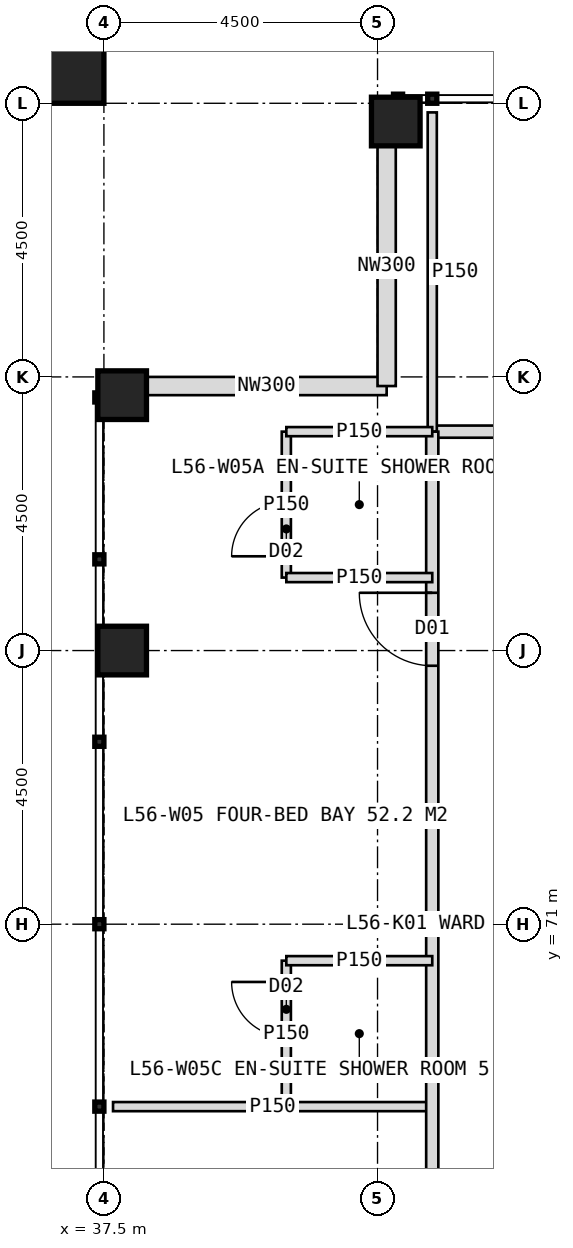
"""IFC4 building model, lengths in metres.
Left out: names, types, materials, properties, quantities, classifications, styles, units other than length and angle.
Written with IfcOpenShell. Run it as: python <this file> out.ifc"""

import sys

from ifc_helpers import new_model, si_unit, direction, frame, frame_2d, origin, origin_2d, place, context, subcontext, project, spatial, rectangle, hollow_rectangle, extrude, element, fill, save


model = new_model("IFC4")
c1 = context("Model", 3, precision=1e-05, world=origin(), true_north=direction((0.0, 1.0)))
c2 = subcontext(c1, "Body", "Model", "MODEL_VIEW")
j1 = project(units=[si_unit("LENGTHUNIT", "METRE"), si_unit("PLANEANGLEUNIT", "RADIAN")], contexts=[c1])
p1 = place(None, origin())
s1 = spatial("IfcSite", under=j1, at=p1, CompositionType="ELEMENT")
p2 = place(p1, origin())
s2 = spatial("IfcBuilding", under=s1, at=p2, CompositionType="ELEMENT")
p3 = place(p2, frame((0.0, 0.0, 233.0)))
s3 = spatial("IfcBuildingStorey", under=s2, at=p3, CompositionType="ELEMENT", Elevation=233.0)
for number, where, z_axis, x_axis in (
    (1, (42.3, 84.2, 0.0), (0.0, 0.0, 1.0), (1.0, 0.0, 0.0)),
    (2, (37.8, 75.5, 0.0), (0.0, 0.0, 1.0), (1.0, 0.0, 0.0)),
    (3, (37.8, 79.7, 0.0), (0.0, 0.0, 1.0), (1.0, 0.0, 0.0)),
):
    element("IfcColumn", number, at=place(p3, frame(where, z_axis=z_axis, x_axis=x_axis)), inside=s3, PredefinedType="COLUMN", context=c2, shape_type="SweptSolid", body=[
        extrude(hollow_rectangle(XDim=0.8, YDim=0.8, WallThickness=0.08, at=origin_2d()), origin(), (0.0, 0.0, 1.0), 4.0),
    ])
p4 = place(p3, frame((36.9, 85.1, 0.0), z_axis=(0.0, 0.0, 1.0), x_axis=(1.0, 0.0, 0.0)))
e4 = element("IfcColumn", 4, at=p4, inside=s3, PredefinedType="COLUMN", context=c2, shape_type="SweptSolid", body=[
    extrude(hollow_rectangle(XDim=1.2, YDim=1.2, WallThickness=0.07, at=origin_2d()), origin(), (0.0, 0.0, 1.0), 4.0),
])
for number, where, z_axis, x_axis in (
    (5, (38.2, 79.85, 0.0), (0.0, 0.0, 1.0), (1.0, 0.0, 0.0)),
    (6, (42.15, 79.85, 0.0), (0.0, 0.0, 1.0), (0.0, 1.0, 0.0)),
):
    element("IfcWall", number, at=place(p3, frame(where, z_axis=z_axis, x_axis=x_axis)), inside=s3, PredefinedType="ELEMENTEDWALL", context=c2, shape_type="SweptSolid", body=[
        extrude(rectangle(XDim=3.95, YDim=0.3, at=frame_2d((1.975, 0.0))), origin(), (0.0, 0.0, 1.0), 2.85),
    ])
p5 = place(p3, frame((42.9, 79.1, 0.0), z_axis=(0.0, 0.0, 1.0), x_axis=(1.0, 0.0, 0.0)))
e7 = element("IfcWall", 7, at=p5, inside=s3, PredefinedType="PARTITIONING", context=c2, shape_type="SweptSolid", body=[
    extrude(rectangle(XDim=34.2, YDim=0.2, at=frame_2d((17.1, 0.0))), origin(), (0.0, 0.0, 1.0), 3.75),
])
p6 = place(p5, frame((3.55, 0.0, 0.0)))
e8 = element("IfcOpeningElement", 8, at=p6, cuts=e7, PredefinedType="OPENING", context=c2, shape_type="SweptSolid", body=[
    extrude(rectangle(XDim=1.0, YDim=2.1, at=frame_2d((0.5, 1.05))), frame((0.0, 0.11, 0.0), z_axis=(0.0, -1.0, 0.0), x_axis=(1.0, 0.0, 0.0)), (0.0, 0.0, 1.0), 0.22),
])
p7 = place(p5, frame((10.75, 0.0, 0.0)))
e9 = element("IfcOpeningElement", 9, at=p7, cuts=e7, PredefinedType="OPENING", context=c2, shape_type="SweptSolid", body=[
    extrude(rectangle(XDim=1.2, YDim=2.2, at=frame_2d((0.6, 1.1))), frame((0.0, 0.11, 0.0), z_axis=(0.0, -1.0, 0.0), x_axis=(1.0, 0.0, 0.0)), (0.0, 0.0, 1.0), 0.22),
])
p8 = place(p5, frame((16.25, 0.0, 0.0)))
e10 = element("IfcOpeningElement", 10, at=p8, cuts=e7, PredefinedType="OPENING", context=c2, shape_type="SweptSolid", body=[
    extrude(rectangle(XDim=1.2, YDim=2.2, at=frame_2d((0.6, 1.1))), frame((0.0, 0.11, 0.0), z_axis=(0.0, -1.0, 0.0), x_axis=(1.0, 0.0, 0.0)), (0.0, 0.0, 1.0), 0.22),
])
p9 = place(p5, frame((22.75, 0.0, 0.0)))
e11 = element("IfcOpeningElement", 11, at=p9, cuts=e7, PredefinedType="OPENING", context=c2, shape_type="SweptSolid", body=[
    extrude(rectangle(XDim=1.2, YDim=2.2, at=frame_2d((0.6, 1.1))), frame((0.0, 0.11, 0.0), z_axis=(0.0, -1.0, 0.0), x_axis=(1.0, 0.0, 0.0)), (0.0, 0.0, 1.0), 0.22),
])
p10 = place(p5, frame((29.75, 0.0, 0.0)))
e12 = element("IfcOpeningElement", 12, at=p10, cuts=e7, PredefinedType="OPENING", context=c2, shape_type="SweptSolid", body=[
    extrude(rectangle(XDim=1.2, YDim=2.2, at=frame_2d((0.6, 1.1))), frame((0.0, 0.11, 0.0), z_axis=(0.0, -1.0, 0.0), x_axis=(1.0, 0.0, 0.0)), (0.0, 0.0, 1.0), 0.22),
])
for number, where, z_axis, x_axis in (
    (13, (42.9, 79.1, 0.0), (0.0, 0.0, 1.0), (0.0, 1.0, 0.0)),
    (14, (42.9, 68.0, 0.0), (0.0, 0.0, 1.0), (-1.0, 0.0, 0.0)),
):
    element("IfcWall", number, at=place(p3, frame(where, z_axis=z_axis, x_axis=x_axis)), inside=s3, PredefinedType="PARTITIONING", context=c2, shape_type="SweptSolid", body=[
        extrude(rectangle(XDim=5.25, YDim=0.15, at=frame_2d((2.625, 0.0))), origin(), (0.0, 0.0, 1.0), 3.75),
    ])
p11 = place(p3, frame((42.9, 44.9, 0.0), z_axis=(0.0, 0.0, 1.0), x_axis=(0.0, 1.0, 0.0)))
e15 = element("IfcWall", 15, at=p11, inside=s3, PredefinedType="PARTITIONING", context=c2, shape_type="SweptSolid", body=[
    extrude(rectangle(XDim=34.2, YDim=0.2, at=frame_2d((17.1, 0.0))), origin(), (0.0, 0.0, 1.0), 3.75),
])
p12 = place(p11, frame((1.25, 0.0, 0.0)))
e16 = element("IfcOpeningElement", 16, at=p12, cuts=e15, PredefinedType="OPENING", context=c2, shape_type="SweptSolid", body=[
    extrude(rectangle(XDim=1.2, YDim=2.2, at=frame_2d((0.6, 1.1))), frame((0.0, 0.11, 0.0), z_axis=(0.0, -1.0, 0.0), x_axis=(1.0, 0.0, 0.0)), (0.0, 0.0, 1.0), 0.22),
])
p13 = place(p11, frame((7.75, 0.0, 0.0)))
e17 = element("IfcOpeningElement", 17, at=p13, cuts=e15, PredefinedType="OPENING", context=c2, shape_type="SweptSolid", body=[
    extrude(rectangle(XDim=1.2, YDim=2.2, at=frame_2d((0.6, 1.1))), frame((0.0, 0.11, 0.0), z_axis=(0.0, -1.0, 0.0), x_axis=(1.0, 0.0, 0.0)), (0.0, 0.0, 1.0), 0.22),
])
p14 = place(p11, frame((13.6, 0.0, 0.0)))
e18 = element("IfcOpeningElement", 18, at=p14, cuts=e15, PredefinedType="OPENING", context=c2, shape_type="SweptSolid", body=[
    extrude(rectangle(XDim=1.0, YDim=2.1, at=frame_2d((0.5, 1.05))), frame((0.0, 0.11, 0.0), z_axis=(0.0, -1.0, 0.0), x_axis=(1.0, 0.0, 0.0)), (0.0, 0.0, 1.0), 0.22),
])
p15 = place(p11, frame((19.75, 0.0, 0.0)))
e19 = element("IfcOpeningElement", 19, at=p15, cuts=e15, PredefinedType="OPENING", context=c2, shape_type="SweptSolid", body=[
    extrude(rectangle(XDim=1.2, YDim=2.2, at=frame_2d((0.6, 1.1))), frame((0.0, 0.11, 0.0), z_axis=(0.0, -1.0, 0.0), x_axis=(1.0, 0.0, 0.0)), (0.0, 0.0, 1.0), 0.22),
])
p16 = place(p11, frame((30.35, 0.0, 0.0)))
e20 = element("IfcOpeningElement", 20, at=p16, cuts=e15, PredefinedType="OPENING", context=c2, shape_type="SweptSolid", body=[
    extrude(rectangle(XDim=1.2, YDim=2.2, at=frame_2d((0.6, 1.1))), frame((0.0, 0.11, 0.0), z_axis=(0.0, -1.0, 0.0), x_axis=(1.0, 0.0, 0.0)), (0.0, 0.0, 1.0), 0.22),
])
p17 = place(p3, frame((40.5, 76.7, 0.0), z_axis=(0.0, 0.0, 1.0), x_axis=(0.0, 1.0, 0.0)))
e21 = element("IfcWall", 21, at=p17, inside=s3, PredefinedType="PARTITIONING", context=c2, shape_type="SweptSolid", body=[
    extrude(rectangle(XDim=2.4, YDim=0.15, at=frame_2d((1.2, 0.0))), origin(), (0.0, 0.0, 1.0), 3.75),
])
p18 = place(p17, frame((0.35, 0.0, 0.0)))
e22 = element("IfcOpeningElement", 22, at=p18, cuts=e21, PredefinedType="OPENING", context=c2, shape_type="SweptSolid", body=[
    extrude(rectangle(XDim=0.9, YDim=2.1, at=frame_2d((0.45, 1.05))), frame((0.0, 0.085, 0.0), z_axis=(0.0, -1.0, 0.0), x_axis=(1.0, 0.0, 0.0)), (0.0, 0.0, 1.0), 0.17),
])
p19 = place(p3, frame((42.9, 76.7, 0.0), z_axis=(0.0, 0.0, 1.0), x_axis=(-1.0, 0.0, 0.0)))
e23 = element("IfcWall", 23, at=p19, inside=s3, PredefinedType="PARTITIONING", context=c2, shape_type="SweptSolid", body=[
    extrude(rectangle(XDim=2.4, YDim=0.15, at=frame_2d((1.2, 0.0))), origin(), (0.0, 0.0, 1.0), 3.75),
])
p20 = place(p3, frame((40.5, 68.0, 0.0), z_axis=(0.0, 0.0, 1.0), x_axis=(0.0, 1.0, 0.0)))
e24 = element("IfcWall", 24, at=p20, inside=s3, PredefinedType="PARTITIONING", context=c2, shape_type="SweptSolid", body=[
    extrude(rectangle(XDim=2.4, YDim=0.15, at=frame_2d((1.2, 0.0))), origin(), (0.0, 0.0, 1.0), 3.75),
])
p21 = place(p20, frame((1.15, 0.0, 0.0)))
e25 = element("IfcOpeningElement", 25, at=p21, cuts=e24, PredefinedType="OPENING", context=c2, shape_type="SweptSolid", body=[
    extrude(rectangle(XDim=0.9, YDim=2.1, at=frame_2d((0.45, 1.05))), frame((0.0, 0.085, 0.0), z_axis=(0.0, -1.0, 0.0), x_axis=(1.0, 0.0, 0.0)), (0.0, 0.0, 1.0), 0.17),
])
for number, where, z_axis, x_axis in (
    (26, (42.9, 70.4, 0.0), (0.0, 0.0, 1.0), (-1.0, 0.0, 0.0)),
    (27, (42.9, 79.1, 0.0), (0.0, 0.0, 1.0), (-1.0, 0.0, 0.0)),
):
    element("IfcWall", number, at=place(p3, frame(where, z_axis=z_axis, x_axis=x_axis)), inside=s3, PredefinedType="PARTITIONING", context=c2, shape_type="SweptSolid", body=[
        extrude(rectangle(XDim=2.4, YDim=0.15, at=frame_2d((1.2, 0.0))), origin(), (0.0, 0.0, 1.0), 3.75),
    ])
p22 = place(p16, origin())
e28 = element("IfcDoor", 28, at=p22, inside=s3, OperationType="SINGLE_SWING_RIGHT", PredefinedType="DOOR", context=c2, shape_type="SweptSolid", body=[
    extrude(rectangle(XDim=1.2, YDim=2.2, at=frame_2d((0.6, 1.1))), frame((0.0, 0.025, 0.0), z_axis=(0.0, -1.0, 0.0), x_axis=(1.0, 0.0, 0.0)), (0.0, 0.0, 1.0), 0.05),
])
fill(e20, e28)
p23 = place(p18, origin())
e29 = element("IfcDoor", 29, at=p23, inside=s3, OperationType="SINGLE_SWING_LEFT", PredefinedType="DOOR", context=c2, shape_type="SweptSolid", body=[
    extrude(rectangle(XDim=0.9, YDim=2.1, at=frame_2d((0.45, 1.05))), frame((0.0, 0.025, 0.0), z_axis=(0.0, -1.0, 0.0), x_axis=(1.0, 0.0, 0.0)), (0.0, 0.0, 1.0), 0.05),
])
fill(e22, e29)
p24 = place(p21, origin())
e30 = element("IfcDoor", 30, at=p24, inside=s3, OperationType="SINGLE_SWING_RIGHT", PredefinedType="DOOR", context=c2, shape_type="SweptSolid", body=[
    extrude(rectangle(XDim=0.9, YDim=2.1, at=frame_2d((0.45, 1.05))), frame((0.0, 0.025, 0.0), z_axis=(0.0, -1.0, 0.0), x_axis=(1.0, 0.0, 0.0)), (0.0, 0.0, 1.0), 0.05),
])
fill(e25, e30)
save(model, sys.argv[1])
